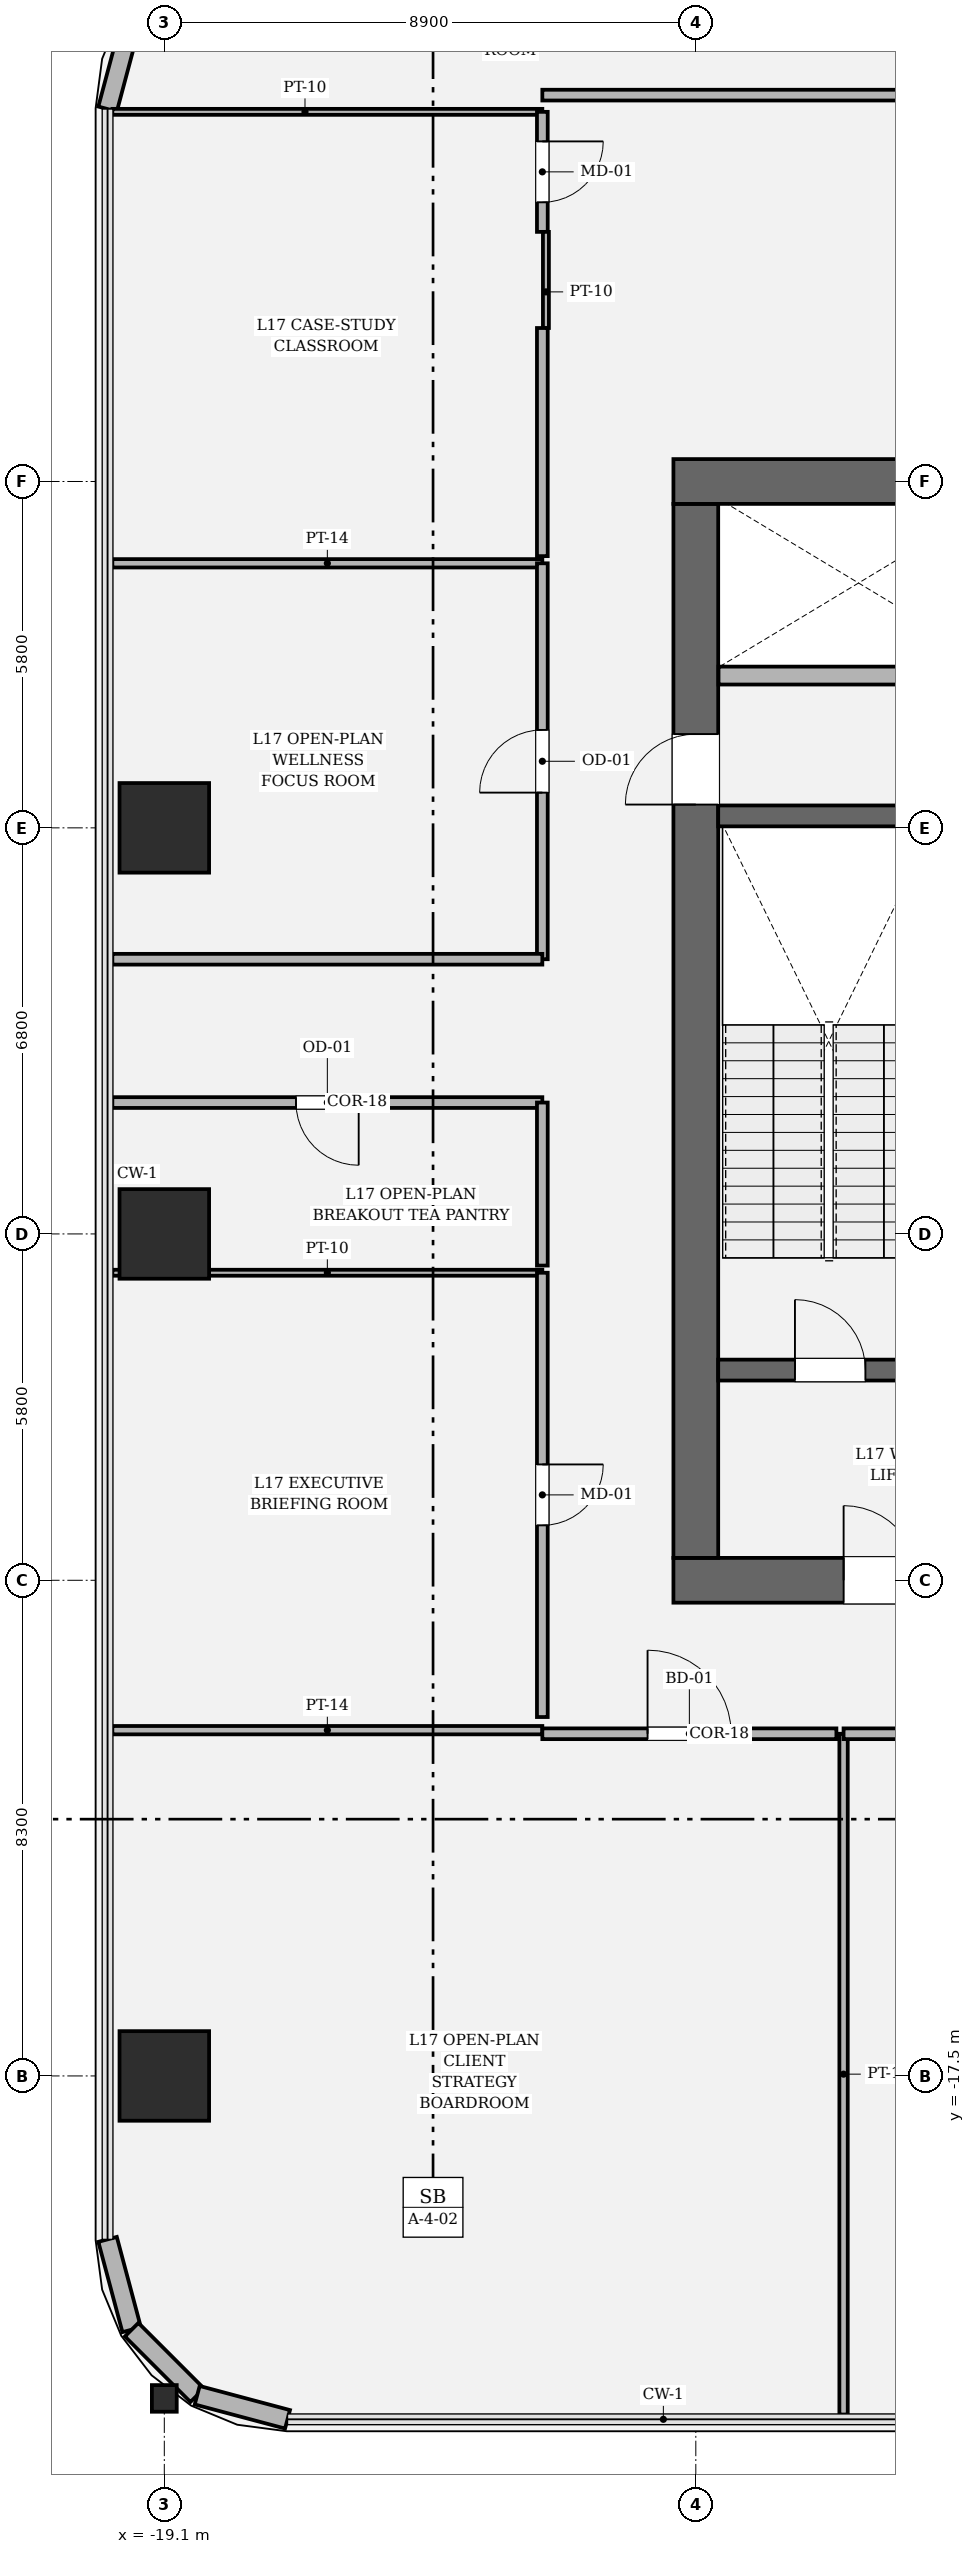
"""IFC4 building model, lengths in metres.
Left out: names, types, materials, properties, quantities, classifications, styles, units other than length and angle.
Written with IfcOpenShell. Run it as: python <this file> out.ifc"""

import sys

from ifc_helpers import new_model, si_unit, direction, frame, frame_2d, origin, origin_2d, place, context, subcontext, project, spatial, rectangle, hollow_rectangle, i_section, extrude, element, fill, save


model = new_model("IFC4")
c1 = context("Model", 3, precision=1e-05, world=origin(), true_north=direction((0.0, 1.0)))
c2 = subcontext(c1, "Body", "Model", "MODEL_VIEW")
j1 = project(units=[si_unit("LENGTHUNIT", "METRE"), si_unit("PLANEANGLEUNIT", "RADIAN")], contexts=[c1])
p1 = place(None, origin())
s1 = spatial("IfcSite", under=j1, at=p1, CompositionType="ELEMENT")
p2 = place(p1, origin())
s2 = spatial("IfcBuilding", under=s1, at=p2, CompositionType="ELEMENT")
p3 = place(p2, frame((0.0, 0.0, 76.8)))
s3 = spatial("IfcBuildingStorey", under=s2, at=p3, CompositionType="ELEMENT", Elevation=76.8)
p4 = place(p3, frame((10.575, -9.2, 0.0), z_axis=(0.0, 0.0, 1.0), x_axis=(-1.0, 0.0, 0.0)))
e1 = element("IfcWall", 1, at=p4, inside=s3, PredefinedType="SHEAR", context=c2, shape_type="SweptSolid", body=[
    extrude(rectangle(XDim=21.15, YDim=0.75, at=frame_2d((10.575, 0.0))), origin(), (0.0, 0.0, 1.0), 4.05),
])
p5 = place(p4, frame((2.85, 0.0, 0.0)))
e2 = element("IfcOpeningElement", 2, at=p5, cuts=e1, PredefinedType="OPENING", context=c2, shape_type="SweptSolid", body=[
    extrude(rectangle(XDim=1.25, YDim=2.25, at=frame_2d((0.625, 1.125))), frame((0.0, 0.385, 0.0), z_axis=(0.0, -1.0, 0.0), x_axis=(1.0, 0.0, 0.0)), (0.0, 0.0, 1.0), 0.77),
])
p6 = place(p4, frame((17.05, 0.0, 0.0)))
e3 = element("IfcOpeningElement", 3, at=p6, cuts=e1, PredefinedType="OPENING", context=c2, shape_type="SweptSolid", body=[
    extrude(rectangle(XDim=1.25, YDim=2.25, at=frame_2d((0.625, 1.125))), frame((0.0, 0.385, 0.0), z_axis=(0.0, -1.0, 0.0), x_axis=(1.0, 0.0, 0.0)), (0.0, 0.0, 1.0), 0.77),
])
p7 = place(p3, frame((-10.2, -8.825, 0.0), z_axis=(0.0, 0.0, 1.0), x_axis=(0.0, 1.0, 0.0)))
e4 = element("IfcWall", 4, at=p7, inside=s3, PredefinedType="SHEAR", context=c2, shape_type="SweptSolid", body=[
    extrude(rectangle(XDim=17.65, YDim=0.75, at=frame_2d((8.825, 0.0))), origin(), (0.0, 0.0, 1.0), 4.05),
])
p8 = place(p7, frame((12.615, 0.0, 0.0)))
e5 = element("IfcOpeningElement", 5, at=p8, cuts=e4, PredefinedType="OPENING", context=c2, shape_type="SweptSolid", body=[
    extrude(rectangle(XDim=1.18, YDim=2.2, at=frame_2d((0.59, 1.1))), frame((0.0, 0.385, 0.0), z_axis=(0.0, -1.0, 0.0), x_axis=(1.0, 0.0, 0.0)), (0.0, 0.0, 1.0), 0.77),
])
p9 = place(p3, frame((-10.575, 9.2, 0.0), z_axis=(0.0, 0.0, 1.0), x_axis=(1.0, 0.0, 0.0)))
e6 = element("IfcWall", 6, at=p9, inside=s3, PredefinedType="SHEAR", context=c2, shape_type="SweptSolid", body=[
    extrude(rectangle(XDim=21.15, YDim=0.75, at=frame_2d((10.575, 0.0))), origin(), (0.0, 0.0, 1.0), 4.05),
])
p10 = place(p3, frame((-9.825, -5.68, 0.0), z_axis=(0.0, 0.0, 1.0), x_axis=(1.0, 0.0, 0.0)))
e7 = element("IfcWall", 7, at=p10, inside=s3, PredefinedType="SOLIDWALL", context=c2, shape_type="SweptSolid", body=[
    extrude(rectangle(XDim=5.175, YDim=0.35, at=frame_2d((2.587, 0.0))), origin(), (0.0, 0.0, 1.0), 4.05),
])
p11 = place(p10, frame((1.285, 0.0, 0.0)))
e8 = element("IfcOpeningElement", 8, at=p11, cuts=e7, PredefinedType="OPENING", context=c2, shape_type="SweptSolid", body=[
    extrude(rectangle(XDim=1.18, YDim=2.2, at=frame_2d((0.59, 1.1))), frame((0.0, 0.185, 0.0), z_axis=(0.0, -1.0, 0.0), x_axis=(1.0, 0.0, 0.0)), (0.0, 0.0, 1.0), 0.37),
])
p12 = place(p3, frame((-9.825, 3.6, 0.0), z_axis=(0.0, 0.0, 1.0), x_axis=(1.0, 0.0, 0.0)))
e9 = element("IfcWall", 9, at=p12, inside=s3, PredefinedType="SOLIDWALL", context=c2, shape_type="SweptSolid", body=[
    extrude(rectangle(XDim=5.175, YDim=0.35, at=frame_2d((2.587, 0.0))), origin(), (0.0, 0.0, 1.0), 4.05),
])
for number, where, z_axis, x_axis in (
    (10, (-19.1, -17.5, 0.0), (0.0, 0.0, 1.0), (1.0, 0.0, 0.0)),
    (11, (-19.1, 3.4, 0.0), (0.0, 0.0, 1.0), (1.0, 0.0, 0.0)),
    (12, (-19.1, -3.4, 0.0), (0.0, 0.0, 1.0), (1.0, 0.0, 0.0)),
):
    element("IfcColumn", number, at=place(p3, frame(where, z_axis=z_axis, x_axis=x_axis)), inside=s3, PredefinedType="COLUMN", context=c2, shape_type="SweptSolid", body=[
        extrude(hollow_rectangle(XDim=1.5, YDim=1.5, WallThickness=0.045, at=origin_2d()), origin(), (0.0, 0.0, 1.0), 4.05),
    ])
p13 = place(p3, frame((-19.1, -22.9, 0.0), z_axis=(0.0, 0.0, 1.0), x_axis=(1.0, 0.0, 0.0)))
e13 = element("IfcColumn", 13, at=p13, inside=s3, PredefinedType="COLUMN", context=c2, shape_type="SweptSolid", body=[
    extrude(i_section(OverallWidth=0.416, OverallDepth=0.446, WebThickness=0.039, FlangeThickness=0.062, FilletRadius=0.018, at=origin_2d()), origin(), (0.0, 0.0, 1.0), 4.048),
])
for number, where, z_axis, x_axis in (
    (14, (-19.646, 16.949, 0.0), (0.0, 0.0, 1.0), (-0.258, -0.966, 0.0)),
    (15, (-20.05, -20.237, 0.0), (0.0, 0.0, 1.0), (0.258, -0.966, 0.0)),
):
    element("IfcWall", number, at=place(p3, frame(where, z_axis=z_axis, x_axis=x_axis)), inside=s3, PredefinedType="SOLIDWALL", context=c2, shape_type="SweptSolid", body=[
        extrude(rectangle(XDim=1.565, YDim=0.32, at=frame_2d((0.783, 0.0))), origin(), (0.0, 0.0, 1.0), 3.81),
    ])
p14 = place(p3, frame((-19.646, -21.749, 0.0), z_axis=(0.0, 0.0, 1.0), x_axis=(0.707028130747, -0.707185422879, 0.0)))
e16 = element("IfcWall", 16, at=p14, inside=s3, PredefinedType="SOLIDWALL", context=c2, shape_type="SweptSolid", body=[
    extrude(rectangle(XDim=1.552, YDim=0.32, at=frame_2d((0.776, 0.0))), origin(), (0.0, 0.0, 1.0), 2.484),
])
p15 = place(p3, frame((-18.549, -22.847, 0.0), z_axis=(0.0, 0.0, 1.0), x_axis=(0.966224582397, -0.257701486942, 0.0)))
e17 = element("IfcWall", 17, at=p15, inside=s3, PredefinedType="SOLIDWALL", context=c2, shape_type="SweptSolid", body=[
    extrude(rectangle(XDim=1.565, YDim=0.32, at=frame_2d((0.783, 0.0))), origin(), (0.0, 0.0, 1.0), 2.524),
])
p16 = place(p3, frame((-9.82, 5.95, 0.0), z_axis=(0.0, 0.0, 1.0), x_axis=(1.0, 0.0, 0.0)))
e18 = element("IfcWall", 18, at=p16, inside=s3, PredefinedType="SOLIDWALL", context=c2, shape_type="SweptSolid", body=[
    extrude(rectangle(XDim=4.76, YDim=0.3, at=frame_2d((2.38, 0.0))), origin(), (0.0, 0.0, 1.0), 3.81),
])
p17 = place(p3, frame((-7.726, -23.17, 0.0), z_axis=(0.0, 0.0, 1.0), x_axis=(0.0, 1.0, 0.0)))
e19 = element("IfcWall", 19, at=p17, inside=s3, PredefinedType="PARTITIONING", context=c2, shape_type="SweptSolid", body=[
    extrude(rectangle(XDim=11.4, YDim=0.14, at=frame_2d((5.7, 0.0))), origin(), (0.0, 0.0, 1.0), 2.524),
])
p18 = place(p3, frame((-7.726, -11.77, 0.0), z_axis=(0.0, 0.0, 1.0), x_axis=(1.0, 0.0, 0.0)))
e20 = element("IfcWall", 20, at=p18, inside=s3, PredefinedType="PARTITIONING", context=c2, shape_type="SweptSolid", body=[
    extrude(rectangle(XDim=17.474, YDim=0.18, at=frame_2d((8.737, 0.0))), origin(), (0.0, 0.0, 1.0), 3.104),
])
p19 = place(p18, frame((8.037, 0.0, 0.0)))
e21 = element("IfcOpeningElement", 21, at=p19, cuts=e20, PredefinedType="OPENING", context=c2, shape_type="SweptSolid", body=[
    extrude(rectangle(XDim=1.4, YDim=2.25, at=frame_2d((0.7, 1.125))), frame((0.0, 0.1, 0.0), z_axis=(0.0, -1.0, 0.0), x_axis=(1.0, 0.0, 0.0)), (0.0, 0.0, 1.0), 0.2),
])
p20 = place(p3, frame((-19.97, -11.71, 0.0), z_axis=(0.0, 0.0, 1.0), x_axis=(1.0, 0.0, 0.0)))
e22 = element("IfcWall", 22, at=p20, inside=s3, PredefinedType="PARTITIONING", context=c2, shape_type="SweptSolid", body=[
    extrude(rectangle(XDim=7.2, YDim=0.14, at=frame_2d((3.6, 0.0))), origin(), (0.0, 0.0, 1.0), 3.104),
])
p21 = place(p3, frame((-12.77, -11.77, 0.0), z_axis=(0.0, 0.0, 1.0), x_axis=(1.0, 0.0, 0.0)))
e23 = element("IfcWall", 23, at=p21, inside=s3, PredefinedType="PARTITIONING", context=c2, shape_type="SweptSolid", body=[
    extrude(rectangle(XDim=4.924, YDim=0.18, at=frame_2d((2.462, 0.0))), origin(), (0.0, 0.0, 1.0), 3.104),
])
p22 = place(p21, frame((1.762, 0.0, 0.0)))
e24 = element("IfcOpeningElement", 24, at=p22, cuts=e23, PredefinedType="OPENING", context=c2, shape_type="SweptSolid", body=[
    extrude(rectangle(XDim=1.4, YDim=2.25, at=frame_2d((0.7, 1.125))), frame((0.0, 0.1, 0.0), z_axis=(0.0, -1.0, 0.0), x_axis=(1.0, 0.0, 0.0)), (0.0, 0.0, 1.0), 0.2),
])
p23 = place(p3, frame((-19.97, -4.05, 0.0), z_axis=(0.0, 0.0, 1.0), x_axis=(1.0, 0.0, 0.0)))
e25 = element("IfcWall", 25, at=p23, inside=s3, PredefinedType="PARTITIONING", context=c2, shape_type="SweptSolid", body=[
    extrude(rectangle(XDim=7.2, YDim=0.1, at=frame_2d((3.6, 0.0))), origin(), (0.0, 0.0, 1.0), 3.104),
])
p24 = place(p3, frame((-12.77, -4.05, 0.0), z_axis=(0.0, 0.0, 1.0), x_axis=(0.0, -1.0, 0.0)))
e26 = element("IfcWall", 26, at=p24, inside=s3, PredefinedType="PARTITIONING", context=c2, shape_type="SweptSolid", body=[
    extrude(rectangle(XDim=7.44, YDim=0.18, at=frame_2d((3.72, 0.0))), origin(), (0.0, 0.0, 1.0), 3.104),
])
p25 = place(p24, frame((3.21, 0.0, 0.0)))
e27 = element("IfcOpeningElement", 27, at=p25, cuts=e26, PredefinedType="OPENING", context=c2, shape_type="SweptSolid", body=[
    extrude(rectangle(XDim=1.02, YDim=2.2, at=frame_2d((0.51, 1.1))), frame((0.0, 0.1, 0.0), z_axis=(0.0, -1.0, 0.0), x_axis=(1.0, 0.0, 0.0)), (0.0, 0.0, 1.0), 0.2),
])
p26 = place(p3, frame((-19.97, -1.2, 0.0), z_axis=(0.0, 0.0, 1.0), x_axis=(1.0, 0.0, 0.0)))
e28 = element("IfcWall", 28, at=p26, inside=s3, PredefinedType="PARTITIONING", context=c2, shape_type="SweptSolid", body=[
    extrude(rectangle(XDim=7.2, YDim=0.18, at=frame_2d((3.6, 0.0))), origin(), (0.0, 0.0, 1.0), 3.104),
])
p27 = place(p26, frame((3.075, 0.0, 0.0)))
e29 = element("IfcOpeningElement", 29, at=p27, cuts=e28, PredefinedType="OPENING", context=c2, shape_type="SweptSolid", body=[
    extrude(rectangle(XDim=1.05, YDim=2.2, at=frame_2d((0.525, 1.1))), frame((0.0, 0.1, 0.0), z_axis=(0.0, -1.0, 0.0), x_axis=(1.0, 0.0, 0.0)), (0.0, 0.0, 1.0), 0.2),
])
p28 = place(p3, frame((-12.77, -1.2, 0.0), z_axis=(0.0, 0.0, 1.0), x_axis=(0.0, -1.0, 0.0)))
e30 = element("IfcWall", 30, at=p28, inside=s3, PredefinedType="PARTITIONING", context=c2, shape_type="SweptSolid", body=[
    extrude(rectangle(XDim=2.73, YDim=0.18, at=frame_2d((1.365, 0.0))), origin(), (0.0, 0.0, 1.0), 3.104),
])
p29 = place(p3, frame((-19.97, 7.83, 0.0), z_axis=(0.0, 0.0, 1.0), x_axis=(1.0, 0.0, 0.0)))
e31 = element("IfcWall", 31, at=p29, inside=s3, PredefinedType="PARTITIONING", context=c2, shape_type="SweptSolid", body=[
    extrude(rectangle(XDim=7.2, YDim=0.14, at=frame_2d((3.6, 0.0))), origin(), (0.0, 0.0, 1.0), 3.104),
])
p30 = place(p3, frame((-12.77, 7.83, 0.0), z_axis=(0.0, 0.0, 1.0), x_axis=(0.0, -1.0, 0.0)))
e32 = element("IfcWall", 32, at=p30, inside=s3, PredefinedType="PARTITIONING", context=c2, shape_type="SweptSolid", body=[
    extrude(rectangle(XDim=6.63, YDim=0.18, at=frame_2d((3.315, 0.0))), origin(), (0.0, 0.0, 1.0), 3.104),
])
p31 = place(p30, frame((2.79, 0.0, 0.0)))
e33 = element("IfcOpeningElement", 33, at=p31, cuts=e32, PredefinedType="OPENING", context=c2, shape_type="SweptSolid", body=[
    extrude(rectangle(XDim=1.05, YDim=2.2, at=frame_2d((0.525, 1.1))), frame((0.0, 0.1, 0.0), z_axis=(0.0, -1.0, 0.0), x_axis=(1.0, 0.0, 0.0)), (0.0, 0.0, 1.0), 0.2),
])
p32 = place(p3, frame((-12.77, 1.2, 0.0), z_axis=(0.0, 0.0, 1.0), x_axis=(-1.0, 0.0, 0.0)))
e34 = element("IfcWall", 34, at=p32, inside=s3, PredefinedType="PARTITIONING", context=c2, shape_type="SweptSolid", body=[
    extrude(rectangle(XDim=7.2, YDim=0.18, at=frame_2d((3.6, 0.0))), origin(), (0.0, 0.0, 1.0), 3.104),
])
p33 = place(p3, frame((-19.97, 15.39, 0.0), z_axis=(0.0, 0.0, 1.0), x_axis=(1.0, 0.0, 0.0)))
e35 = element("IfcWall", 35, at=p33, inside=s3, PredefinedType="PARTITIONING", context=c2, shape_type="SweptSolid", body=[
    extrude(rectangle(XDim=7.2, YDim=0.1, at=frame_2d((3.6, 0.0))), origin(), (0.0, 0.0, 1.0), 3.104),
])
p34 = place(p3, frame((-12.77, 15.39, 0.0), z_axis=(0.0, 0.0, 1.0), x_axis=(0.0, -1.0, 0.0)))
e36 = element("IfcWall", 36, at=p34, inside=s3, PredefinedType="PARTITIONING", context=c2, shape_type="SweptSolid", body=[
    extrude(rectangle(XDim=2.01, YDim=0.18, at=frame_2d((1.005, 0.0))), origin(), (0.0, 0.0, 1.0), 3.354),
])
p35 = place(p34, frame((0.495, 0.0, 0.0)))
e37 = element("IfcOpeningElement", 37, at=p35, cuts=e36, PredefinedType="OPENING", context=c2, shape_type="SweptSolid", body=[
    extrude(rectangle(XDim=1.02, YDim=2.2, at=frame_2d((0.51, 1.1))), frame((0.0, 0.1, 0.0), z_axis=(0.0, -1.0, 0.0), x_axis=(1.0, 0.0, 0.0)), (0.0, 0.0, 1.0), 0.2),
])
p36 = place(p3, frame((-12.71, 13.38, 0.0), z_axis=(0.0, 0.0, 1.0), x_axis=(0.0, -1.0, 0.0)))
e38 = element("IfcWall", 38, at=p36, inside=s3, PredefinedType="PARTITIONING", context=c2, shape_type="SweptSolid", body=[
    extrude(rectangle(XDim=1.61, YDim=0.1, at=frame_2d((0.805, 0.0))), origin(), (0.0, 0.0, 1.0), 3.354),
])
p37 = place(p3, frame((-12.77, 11.77, 0.0), z_axis=(0.0, 0.0, 1.0), x_axis=(0.0, -1.0, 0.0)))
e39 = element("IfcWall", 39, at=p37, inside=s3, PredefinedType="PARTITIONING", context=c2, shape_type="SweptSolid", body=[
    extrude(rectangle(XDim=3.82, YDim=0.18, at=frame_2d((1.91, 0.0))), origin(), (0.0, 0.0, 1.0), 3.104),
])
p38 = place(p3, frame((10.674, 15.67, 0.0), z_axis=(0.0, 0.0, 1.0), x_axis=(-1.0, 0.0, 0.0)))
e40 = element("IfcWall", 40, at=p38, inside=s3, PredefinedType="PARTITIONING", context=c2, shape_type="SweptSolid", body=[
    extrude(rectangle(XDim=23.444, YDim=0.18, at=frame_2d((11.722, 0.0))), origin(), (0.0, 0.0, 1.0), 3.104),
])
p39 = place(p38, frame((15.522, 0.0, 0.0)))
e41 = element("IfcOpeningElement", 41, at=p39, cuts=e40, PredefinedType="OPENING", context=c2, shape_type="SweptSolid", body=[
    extrude(rectangle(XDim=1.4, YDim=2.25, at=frame_2d((0.7, 1.125))), frame((0.0, 0.1, 0.0), z_axis=(0.0, -1.0, 0.0), x_axis=(1.0, 0.0, 0.0)), (0.0, 0.0, 1.0), 0.2),
])
p40 = place(p11, origin())
e42 = element("IfcDoor", 42, at=p40, inside=s3, OperationType="SINGLE_SWING_LEFT", PredefinedType="DOOR", context=c2, shape_type="SweptSolid", body=[
    extrude(rectangle(XDim=1.18, YDim=2.2, at=frame_2d((0.59, 1.1))), frame((0.0, 0.025, 0.0), z_axis=(0.0, -1.0, 0.0), x_axis=(1.0, 0.0, 0.0)), (0.0, 0.0, 1.0), 0.05),
])
fill(e8, e42)
p41 = place(p6, origin())
e43 = element("IfcDoor", 43, at=p41, inside=s3, OperationType="SINGLE_SWING_RIGHT", PredefinedType="DOOR", context=c2, shape_type="SweptSolid", body=[
    extrude(rectangle(XDim=1.25, YDim=2.25, at=frame_2d((0.625, 1.125))), frame((0.0, 0.025, 0.0), z_axis=(0.0, -1.0, 0.0), x_axis=(1.0, 0.0, 0.0)), (0.0, 0.0, 1.0), 0.05),
])
fill(e3, e43)
p42 = place(p8, origin())
e44 = element("IfcDoor", 44, at=p42, inside=s3, OperationType="SINGLE_SWING_LEFT", PredefinedType="DOOR", context=c2, shape_type="SweptSolid", body=[
    extrude(rectangle(XDim=1.18, YDim=2.2, at=frame_2d((0.59, 1.1))), frame((0.0, 0.025, 0.0), z_axis=(0.0, -1.0, 0.0), x_axis=(1.0, 0.0, 0.0)), (0.0, 0.0, 1.0), 0.05),
])
fill(e5, e44)
p43 = place(p22, origin())
e45 = element("IfcDoor", 45, at=p43, inside=s3, OperationType="SINGLE_SWING_LEFT", PredefinedType="DOOR", context=c2, shape_type="SweptSolid", body=[
    extrude(rectangle(XDim=1.4, YDim=2.25, at=frame_2d((0.7, 1.125))), frame((0.0, 0.025, 0.0), z_axis=(0.0, -1.0, 0.0), x_axis=(1.0, 0.0, 0.0)), (0.0, 0.0, 1.0), 0.05),
])
fill(e24, e45)
p44 = place(p25, origin())
e46 = element("IfcDoor", 46, at=p44, inside=s3, OperationType="SINGLE_SWING_LEFT", PredefinedType="DOOR", context=c2, shape_type="SweptSolid", body=[
    extrude(rectangle(XDim=1.02, YDim=2.2, at=frame_2d((0.51, 1.1))), frame((0.0, 0.025, 0.0), z_axis=(0.0, -1.0, 0.0), x_axis=(1.0, 0.0, 0.0)), (0.0, 0.0, 1.0), 0.05),
])
fill(e27, e46)
p45 = place(p27, origin())
e47 = element("IfcDoor", 47, at=p45, inside=s3, OperationType="SINGLE_SWING_RIGHT", PredefinedType="DOOR", context=c2, shape_type="SweptSolid", body=[
    extrude(rectangle(XDim=1.05, YDim=2.2, at=frame_2d((0.525, 1.1))), frame((0.0, 0.025, 0.0), z_axis=(0.0, -1.0, 0.0), x_axis=(1.0, 0.0, 0.0)), (0.0, 0.0, 1.0), 0.05),
])
fill(e29, e47)
p46 = place(p31, origin())
e48 = element("IfcDoor", 48, at=p46, inside=s3, OperationType="SINGLE_SWING_RIGHT", PredefinedType="DOOR", context=c2, shape_type="SweptSolid", body=[
    extrude(rectangle(XDim=1.05, YDim=2.2, at=frame_2d((0.525, 1.1))), frame((0.0, 0.025, 0.0), z_axis=(0.0, -1.0, 0.0), x_axis=(1.0, 0.0, 0.0)), (0.0, 0.0, 1.0), 0.05),
])
fill(e33, e48)
p47 = place(p35, origin())
e49 = element("IfcDoor", 49, at=p47, inside=s3, OperationType="SINGLE_SWING_LEFT", PredefinedType="DOOR", context=c2, shape_type="SweptSolid", body=[
    extrude(rectangle(XDim=1.02, YDim=2.2, at=frame_2d((0.51, 1.1))), frame((0.0, 0.025, 0.0), z_axis=(0.0, -1.0, 0.0), x_axis=(1.0, 0.0, 0.0)), (0.0, 0.0, 1.0), 0.05),
])
fill(e37, e49)
save(model, sys.argv[1])
